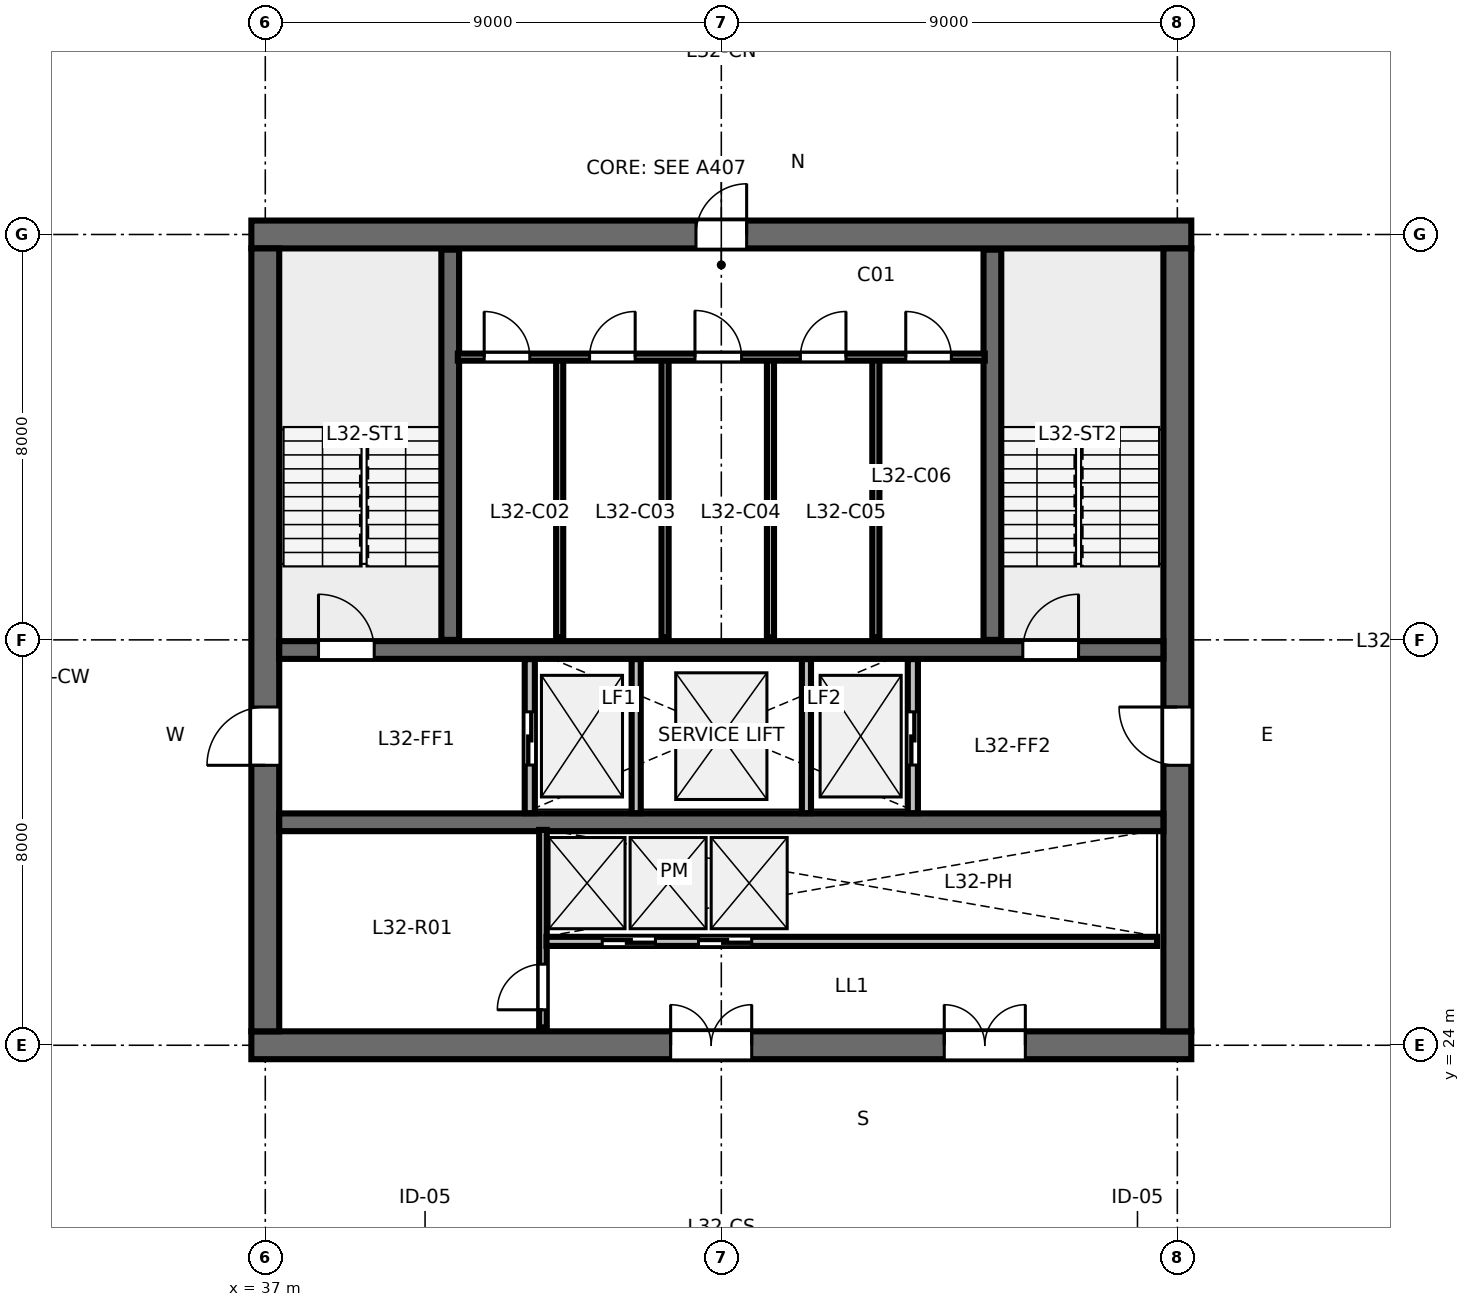
"""IFC4 building model, lengths in metres.
Left out: names, types, materials, properties, quantities, classifications, styles, units other than length and angle.
Written with IfcOpenShell. Run it as: python <this file> out.ifc"""

import sys

from ifc_helpers import new_model, si_unit, direction, frame, frame_2d, origin, place, context, subcontext, project, spatial, rectangle, extrude, element, fill, save


model = new_model("IFC4")
c1 = context("Model", 3, precision=1e-05, world=origin(), true_north=direction((0.0, 1.0)))
c2 = subcontext(c1, "Body", "Model", "MODEL_VIEW")
j1 = project(units=[si_unit("LENGTHUNIT", "METRE"), si_unit("PLANEANGLEUNIT", "RADIAN")], contexts=[c1])
p1 = place(None, origin())
s1 = spatial("IfcSite", under=j1, at=p1, CompositionType="ELEMENT")
p2 = place(p1, origin())
s2 = spatial("IfcBuilding", under=s1, at=p2, CompositionType="ELEMENT")
p3 = place(p2, frame((0.0, 0.0, 124.0)))
s3 = spatial("IfcBuildingStorey", under=s2, at=p3, CompositionType="ELEMENT", Elevation=124.0)
p4 = place(p3, frame((36.725, 24.0, 0.0), z_axis=(0.0, 0.0, 1.0), x_axis=(1.0, 0.0, 0.0)))
e1 = element("IfcWall", 1, at=p4, inside=s3, PredefinedType="SHEAR", context=c2, shape_type="SweptSolid", body=[
    extrude(rectangle(XDim=18.55, YDim=0.55, at=frame_2d((9.275, 0.0))), origin(), (0.0, 0.0, 1.0), 3.36),
])
p5 = place(p4, frame((8.275, 0.0, 0.0)))
e2 = element("IfcOpeningElement", 2, at=p5, cuts=e1, PredefinedType="OPENING", context=c2, shape_type="SweptSolid", body=[
    extrude(rectangle(XDim=1.6, YDim=2.15, at=frame_2d((0.8, 1.075))), frame((0.0, 0.285, 0.0), z_axis=(0.0, -1.0, 0.0), x_axis=(1.0, 0.0, 0.0)), (0.0, 0.0, 1.0), 0.57),
])
p6 = place(p4, frame((13.675, 0.0, 0.0)))
e3 = element("IfcOpeningElement", 3, at=p6, cuts=e1, PredefinedType="OPENING", context=c2, shape_type="SweptSolid", body=[
    extrude(rectangle(XDim=1.6, YDim=2.15, at=frame_2d((0.8, 1.075))), frame((0.0, 0.285, 0.0), z_axis=(0.0, -1.0, 0.0), x_axis=(1.0, 0.0, 0.0)), (0.0, 0.0, 1.0), 0.57),
])
p7 = place(p3, frame((36.725, 40.0, 0.0), z_axis=(0.0, 0.0, 1.0), x_axis=(1.0, 0.0, 0.0)))
e4 = element("IfcWall", 4, at=p7, inside=s3, PredefinedType="SHEAR", context=c2, shape_type="SweptSolid", body=[
    extrude(rectangle(XDim=18.55, YDim=0.55, at=frame_2d((9.275, 0.0))), origin(), (0.0, 0.0, 1.0), 3.36),
])
p8 = place(p7, frame((8.775, 0.0, 0.0)))
e5 = element("IfcOpeningElement", 5, at=p8, cuts=e4, PredefinedType="OPENING", context=c2, shape_type="SweptSolid", body=[
    extrude(rectangle(XDim=1.0, YDim=2.15, at=frame_2d((0.5, 1.075))), frame((0.0, 0.285, 0.0), z_axis=(0.0, -1.0, 0.0), x_axis=(1.0, 0.0, 0.0)), (0.0, 0.0, 1.0), 0.57),
])
p9 = place(p3, frame((37.0, 24.275, 0.0), z_axis=(0.0, 0.0, 1.0), x_axis=(0.0, 1.0, 0.0)))
e6 = element("IfcWall", 6, at=p9, inside=s3, PredefinedType="SHEAR", context=c2, shape_type="SweptSolid", body=[
    extrude(rectangle(XDim=15.45, YDim=0.55, at=frame_2d((7.725, 0.0))), origin(), (0.0, 0.0, 1.0), 3.36),
])
p10 = place(p9, frame((5.25, 0.0, 0.0)))
e7 = element("IfcOpeningElement", 7, at=p10, cuts=e6, PredefinedType="OPENING", context=c2, shape_type="SweptSolid", body=[
    extrude(rectangle(XDim=1.15, YDim=2.15, at=frame_2d((0.575, 1.075))), frame((0.0, 0.285, 0.0), z_axis=(0.0, -1.0, 0.0), x_axis=(1.0, 0.0, 0.0)), (0.0, 0.0, 1.0), 0.57),
])
p11 = place(p3, frame((55.0, 24.275, 0.0), z_axis=(0.0, 0.0, 1.0), x_axis=(0.0, 1.0, 0.0)))
e8 = element("IfcWall", 8, at=p11, inside=s3, PredefinedType="SHEAR", context=c2, shape_type="SweptSolid", body=[
    extrude(rectangle(XDim=15.45, YDim=0.55, at=frame_2d((7.725, 0.0))), origin(), (0.0, 0.0, 1.0), 3.36),
])
p12 = place(p11, frame((5.25, 0.0, 0.0)))
e9 = element("IfcOpeningElement", 9, at=p12, cuts=e8, PredefinedType="OPENING", context=c2, shape_type="SweptSolid", body=[
    extrude(rectangle(XDim=1.15, YDim=2.15, at=frame_2d((0.575, 1.075))), frame((0.0, 0.285, 0.0), z_axis=(0.0, -1.0, 0.0), x_axis=(1.0, 0.0, 0.0)), (0.0, 0.0, 1.0), 0.57),
])
p13 = place(p3, frame((37.275, 31.8, 0.0), z_axis=(0.0, 0.0, 1.0), x_axis=(1.0, 0.0, 0.0)))
e10 = element("IfcWall", 10, at=p13, inside=s3, PredefinedType="SHEAR", context=c2, shape_type="SweptSolid", body=[
    extrude(rectangle(XDim=17.45, YDim=0.35, at=frame_2d((8.725, 0.0))), origin(), (0.0, 0.0, 1.0), 3.36),
])
p14 = place(p13, frame((0.775, 0.0, 0.0)))
e11 = element("IfcOpeningElement", 11, at=p14, cuts=e10, PredefinedType="OPENING", context=c2, shape_type="SweptSolid", body=[
    extrude(rectangle(XDim=1.1, YDim=2.15, at=frame_2d((0.55, 1.075))), frame((0.0, 0.185, 0.0), z_axis=(0.0, -1.0, 0.0), x_axis=(1.0, 0.0, 0.0)), (0.0, 0.0, 1.0), 0.37),
])
p15 = place(p13, frame((14.675, 0.0, 0.0)))
e12 = element("IfcOpeningElement", 12, at=p15, cuts=e10, PredefinedType="OPENING", context=c2, shape_type="SweptSolid", body=[
    extrude(rectangle(XDim=1.1, YDim=2.15, at=frame_2d((0.55, 1.075))), frame((0.0, 0.185, 0.0), z_axis=(0.0, -1.0, 0.0), x_axis=(1.0, 0.0, 0.0)), (0.0, 0.0, 1.0), 0.37),
])
p16 = place(p3, frame((37.275, 28.4, 0.0), z_axis=(0.0, 0.0, 1.0), x_axis=(1.0, 0.0, 0.0)))
e13 = element("IfcWall", 13, at=p16, inside=s3, PredefinedType="SHEAR", context=c2, shape_type="SweptSolid", body=[
    extrude(rectangle(XDim=17.45, YDim=0.35, at=frame_2d((8.725, 0.0))), origin(), (0.0, 0.0, 1.0), 3.36),
])
for number, where, z_axis, x_axis in (
    (14, (40.65, 32.0, 0.0), (0.0, 0.0, 1.0), (0.0, 1.0, 0.0)),
    (15, (51.35, 32.0, 0.0), (0.0, 0.0, 1.0), (0.0, 1.0, 0.0)),
):
    element("IfcWall", number, at=place(p3, frame(where, z_axis=z_axis, x_axis=x_axis)), inside=s3, PredefinedType="SHEAR", context=c2, shape_type="SweptSolid", body=[
        extrude(rectangle(XDim=7.7, YDim=0.35, at=frame_2d((3.85, 0.0))), origin(), (0.0, 0.0, 1.0), 3.6),
    ])
for number, where, z_axis, x_axis in (
    (16, (42.81, 32.05, 0.0), (0.0, 0.0, 1.0), (0.0, 1.0, 0.0)),
    (17, (44.89, 32.05, 0.0), (0.0, 0.0, 1.0), (0.0, 1.0, 0.0)),
    (18, (46.97, 32.05, 0.0), (0.0, 0.0, 1.0), (0.0, 1.0, 0.0)),
    (19, (49.05, 32.05, 0.0), (0.0, 0.0, 1.0), (0.0, 1.0, 0.0)),
):
    element("IfcWall", number, at=place(p3, frame(where, z_axis=z_axis, x_axis=x_axis)), inside=s3, PredefinedType="PARTITIONING", context=c2, shape_type="SweptSolid", body=[
        extrude(rectangle(XDim=5.5, YDim=0.14, at=frame_2d((2.75, 0.0))), origin(), (0.0, 0.0, 1.0), 3.36),
    ])
p17 = place(p3, frame((40.8, 37.58, 0.0), z_axis=(0.0, 0.0, 1.0), x_axis=(1.0, 0.0, 0.0)))
e20 = element("IfcWall", 20, at=p17, inside=s3, PredefinedType="PARTITIONING", context=c2, shape_type="SweptSolid", body=[
    extrude(rectangle(XDim=10.4, YDim=0.14, at=frame_2d((5.2, 0.0))), origin(), (0.0, 0.0, 1.0), 3.36),
])
p18 = place(p17, frame((0.52, 0.0, 0.0)))
e21 = element("IfcOpeningElement", 21, at=p18, cuts=e20, PredefinedType="OPENING", context=c2, shape_type="SweptSolid", body=[
    extrude(rectangle(XDim=0.9, YDim=2.15, at=frame_2d((0.45, 1.075))), frame((0.0, 0.08, 0.0), z_axis=(0.0, -1.0, 0.0), x_axis=(1.0, 0.0, 0.0)), (0.0, 0.0, 1.0), 0.16),
])
p19 = place(p17, frame((2.6, 0.0, 0.0)))
e22 = element("IfcOpeningElement", 22, at=p19, cuts=e20, PredefinedType="OPENING", context=c2, shape_type="SweptSolid", body=[
    extrude(rectangle(XDim=0.9, YDim=2.15, at=frame_2d((0.45, 1.075))), frame((0.0, 0.08, 0.0), z_axis=(0.0, -1.0, 0.0), x_axis=(1.0, 0.0, 0.0)), (0.0, 0.0, 1.0), 0.16),
])
p20 = place(p17, frame((4.68, 0.0, 0.0)))
e23 = element("IfcOpeningElement", 23, at=p20, cuts=e20, PredefinedType="OPENING", context=c2, shape_type="SweptSolid", body=[
    extrude(rectangle(XDim=0.92, YDim=2.15, at=frame_2d((0.46, 1.075))), frame((0.0, 0.08, 0.0), z_axis=(0.0, -1.0, 0.0), x_axis=(1.0, 0.0, 0.0)), (0.0, 0.0, 1.0), 0.16),
])
p21 = place(p17, frame((6.76, 0.0, 0.0)))
e24 = element("IfcOpeningElement", 24, at=p21, cuts=e20, PredefinedType="OPENING", context=c2, shape_type="SweptSolid", body=[
    extrude(rectangle(XDim=0.9, YDim=2.15, at=frame_2d((0.45, 1.075))), frame((0.0, 0.08, 0.0), z_axis=(0.0, -1.0, 0.0), x_axis=(1.0, 0.0, 0.0)), (0.0, 0.0, 1.0), 0.16),
])
p22 = place(p17, frame((8.84, 0.0, 0.0)))
e25 = element("IfcOpeningElement", 25, at=p22, cuts=e20, PredefinedType="OPENING", context=c2, shape_type="SweptSolid", body=[
    extrude(rectangle(XDim=0.9, YDim=2.15, at=frame_2d((0.45, 1.075))), frame((0.0, 0.08, 0.0), z_axis=(0.0, -1.0, 0.0), x_axis=(1.0, 0.0, 0.0)), (0.0, 0.0, 1.0), 0.16),
])
p23 = place(p3, frame((42.22, 28.58, 0.0), z_axis=(0.0, 0.0, 1.0), x_axis=(0.0, 1.0, 0.0)))
e26 = element("IfcWall", 26, at=p23, inside=s3, PredefinedType="PARTITIONING", context=c2, shape_type="SweptSolid", body=[
    extrude(rectangle(XDim=3.04, YDim=0.2, at=frame_2d((1.52, 0.0))), origin(), (0.0, 0.0, 1.0), 3.36),
])
p24 = place(p23, frame((0.95, 0.0, 0.0)))
e27 = element("IfcOpeningElement", 27, at=p24, cuts=e26, PredefinedType="OPENING", context=c2, shape_type="SweptSolid", body=[
    extrude(rectangle(XDim=1.05, YDim=2.15, at=frame_2d((0.525, 1.075))), frame((0.0, 0.11, 0.0), z_axis=(0.0, -1.0, 0.0), x_axis=(1.0, 0.0, 0.0)), (0.0, 0.0, 1.0), 0.22),
])
p25 = place(p3, frame((49.78, 28.58, 0.0), z_axis=(0.0, 0.0, 1.0), x_axis=(0.0, 1.0, 0.0)))
e28 = element("IfcWall", 28, at=p25, inside=s3, PredefinedType="PARTITIONING", context=c2, shape_type="SweptSolid", body=[
    extrude(rectangle(XDim=3.04, YDim=0.2, at=frame_2d((1.52, 0.0))), origin(), (0.0, 0.0, 1.0), 3.36),
])
p26 = place(p25, frame((0.95, 0.0, 0.0)))
e29 = element("IfcOpeningElement", 29, at=p26, cuts=e28, PredefinedType="OPENING", context=c2, shape_type="SweptSolid", body=[
    extrude(rectangle(XDim=1.05, YDim=2.15, at=frame_2d((0.525, 1.075))), frame((0.0, 0.11, 0.0), z_axis=(0.0, -1.0, 0.0), x_axis=(1.0, 0.0, 0.0)), (0.0, 0.0, 1.0), 0.22),
])
for number, where, z_axis, x_axis in (
    (30, (44.32, 28.58, 0.0), (0.0, 0.0, 1.0), (0.0, 1.0, 0.0)),
    (31, (47.68, 28.58, 0.0), (0.0, 0.0, 1.0), (0.0, 1.0, 0.0)),
):
    element("IfcWall", number, at=place(p3, frame(where, z_axis=z_axis, x_axis=x_axis)), inside=s3, PredefinedType="PARTITIONING", context=c2, shape_type="SweptSolid", body=[
        extrude(rectangle(XDim=3.04, YDim=0.18, at=frame_2d((1.52, 0.0))), origin(), (0.0, 0.0, 1.0), 3.36),
    ])
p27 = place(p3, frame((42.48, 24.35, 0.0), z_axis=(0.0, 0.0, 1.0), x_axis=(0.0, 1.0, 0.0)))
e32 = element("IfcWall", 32, at=p27, inside=s3, PredefinedType="PARTITIONING", context=c2, shape_type="SweptSolid", body=[
    extrude(rectangle(XDim=3.9, YDim=0.15, at=frame_2d((1.95, 0.0))), origin(), (0.0, 0.0, 1.0), 3.36),
])
p28 = place(p27, frame((0.35, 0.0, 0.0)))
e33 = element("IfcOpeningElement", 33, at=p28, cuts=e32, PredefinedType="OPENING", context=c2, shape_type="SweptSolid", body=[
    extrude(rectangle(XDim=0.9, YDim=2.15, at=frame_2d((0.45, 1.075))), frame((0.0, 0.085, 0.0), z_axis=(0.0, -1.0, 0.0), x_axis=(1.0, 0.0, 0.0)), (0.0, 0.0, 1.0), 0.17),
])
p29 = place(p3, frame((42.55, 26.05, 0.0), z_axis=(0.0, 0.0, 1.0), x_axis=(1.0, 0.0, 0.0)))
e34 = element("IfcWall", 34, at=p29, inside=s3, PredefinedType="PARTITIONING", context=c2, shape_type="SweptSolid", body=[
    extrude(rectangle(XDim=12.05, YDim=0.18, at=frame_2d((6.025, 0.0))), origin(), (0.0, 0.0, 1.0), 3.36),
])
p30 = place(p29, frame((1.1, 0.0, 0.0)))
e35 = element("IfcOpeningElement", 35, at=p30, cuts=e34, PredefinedType="OPENING", context=c2, shape_type="SweptSolid", body=[
    extrude(rectangle(XDim=1.05, YDim=2.15, at=frame_2d((0.525, 1.075))), frame((0.0, 0.1, 0.0), z_axis=(0.0, -1.0, 0.0), x_axis=(1.0, 0.0, 0.0)), (0.0, 0.0, 1.0), 0.2),
])
p31 = place(p29, frame((3.0, 0.0, 0.0)))
e36 = element("IfcOpeningElement", 36, at=p31, cuts=e34, PredefinedType="OPENING", context=c2, shape_type="SweptSolid", body=[
    extrude(rectangle(XDim=1.05, YDim=2.15, at=frame_2d((0.525, 1.075))), frame((0.0, 0.1, 0.0), z_axis=(0.0, -1.0, 0.0), x_axis=(1.0, 0.0, 0.0)), (0.0, 0.0, 1.0), 0.2),
])
p32 = place(p14, origin())
e37 = element("IfcDoor", 37, at=p32, inside=s3, OperationType="SINGLE_SWING_LEFT", PredefinedType="DOOR", context=c2, shape_type="SweptSolid", body=[
    extrude(rectangle(XDim=1.1, YDim=2.15, at=frame_2d((0.55, 1.075))), frame((0.0, 0.025, 0.0), z_axis=(0.0, -1.0, 0.0), x_axis=(1.0, 0.0, 0.0)), (0.0, 0.0, 1.0), 0.05),
])
fill(e11, e37)
p33 = place(p15, origin())
e38 = element("IfcDoor", 38, at=p33, inside=s3, OperationType="SINGLE_SWING_RIGHT", PredefinedType="DOOR", context=c2, shape_type="SweptSolid", body=[
    extrude(rectangle(XDim=1.1, YDim=2.15, at=frame_2d((0.55, 1.075))), frame((0.0, 0.025, 0.0), z_axis=(0.0, -1.0, 0.0), x_axis=(1.0, 0.0, 0.0)), (0.0, 0.0, 1.0), 0.05),
])
fill(e12, e38)
p34 = place(p8, origin())
e39 = element("IfcDoor", 39, at=p34, inside=s3, OperationType="SINGLE_SWING_RIGHT", PredefinedType="DOOR", context=c2, shape_type="SweptSolid", body=[
    extrude(rectangle(XDim=1.0, YDim=2.15, at=frame_2d((0.5, 1.075))), frame((0.0, 0.025, 0.0), z_axis=(0.0, -1.0, 0.0), x_axis=(1.0, 0.0, 0.0)), (0.0, 0.0, 1.0), 0.05),
])
fill(e5, e39)
p35 = place(p10, origin())
e40 = element("IfcDoor", 40, at=p35, inside=s3, OperationType="SINGLE_SWING_LEFT", PredefinedType="DOOR", context=c2, shape_type="SweptSolid", body=[
    extrude(rectangle(XDim=1.15, YDim=2.15, at=frame_2d((0.575, 1.075))), frame((0.0, 0.025, 0.0), z_axis=(0.0, -1.0, 0.0), x_axis=(1.0, 0.0, 0.0)), (0.0, 0.0, 1.0), 0.05),
])
fill(e7, e40)
p36 = place(p12, origin())
e41 = element("IfcDoor", 41, at=p36, inside=s3, OperationType="SINGLE_SWING_RIGHT", PredefinedType="DOOR", context=c2, shape_type="SweptSolid", body=[
    extrude(rectangle(XDim=1.15, YDim=2.15, at=frame_2d((0.575, 1.075))), frame((0.0, 0.025, 0.0), z_axis=(0.0, -1.0, 0.0), x_axis=(1.0, 0.0, 0.0)), (0.0, 0.0, 1.0), 0.05),
])
fill(e9, e41)
p37 = place(p5, origin())
e42 = element("IfcDoor", 42, at=p37, inside=s3, OperationType="DOUBLE_DOOR_SINGLE_SWING", PredefinedType="DOOR", context=c2, shape_type="SweptSolid", body=[
    extrude(rectangle(XDim=1.6, YDim=2.15, at=frame_2d((0.8, 1.075))), frame((0.0, 0.025, 0.0), z_axis=(0.0, -1.0, 0.0), x_axis=(1.0, 0.0, 0.0)), (0.0, 0.0, 1.0), 0.05),
])
fill(e2, e42)
p38 = place(p6, origin())
e43 = element("IfcDoor", 43, at=p38, inside=s3, OperationType="DOUBLE_DOOR_SINGLE_SWING", PredefinedType="DOOR", context=c2, shape_type="SweptSolid", body=[
    extrude(rectangle(XDim=1.6, YDim=2.15, at=frame_2d((0.8, 1.075))), frame((0.0, 0.025, 0.0), z_axis=(0.0, -1.0, 0.0), x_axis=(1.0, 0.0, 0.0)), (0.0, 0.0, 1.0), 0.05),
])
fill(e3, e43)
p39 = place(p18, origin())
e44 = element("IfcDoor", 44, at=p39, inside=s3, OperationType="SINGLE_SWING_LEFT", PredefinedType="DOOR", context=c2, shape_type="SweptSolid", body=[
    extrude(rectangle(XDim=0.9, YDim=2.15, at=frame_2d((0.45, 1.075))), frame((0.0, 0.025, 0.0), z_axis=(0.0, -1.0, 0.0), x_axis=(1.0, 0.0, 0.0)), (0.0, 0.0, 1.0), 0.05),
])
fill(e21, e44)
p40 = place(p19, origin())
e45 = element("IfcDoor", 45, at=p40, inside=s3, OperationType="SINGLE_SWING_RIGHT", PredefinedType="DOOR", context=c2, shape_type="SweptSolid", body=[
    extrude(rectangle(XDim=0.9, YDim=2.15, at=frame_2d((0.45, 1.075))), frame((0.0, 0.025, 0.0), z_axis=(0.0, -1.0, 0.0), x_axis=(1.0, 0.0, 0.0)), (0.0, 0.0, 1.0), 0.05),
])
fill(e22, e45)
p41 = place(p20, origin())
e46 = element("IfcDoor", 46, at=p41, inside=s3, OperationType="SINGLE_SWING_LEFT", PredefinedType="DOOR", context=c2, shape_type="SweptSolid", body=[
    extrude(rectangle(XDim=0.92, YDim=2.15, at=frame_2d((0.46, 1.075))), frame((0.0, 0.025, 0.0), z_axis=(0.0, -1.0, 0.0), x_axis=(1.0, 0.0, 0.0)), (0.0, 0.0, 1.0), 0.05),
])
fill(e23, e46)
p42 = place(p21, origin())
e47 = element("IfcDoor", 47, at=p42, inside=s3, OperationType="SINGLE_SWING_RIGHT", PredefinedType="DOOR", context=c2, shape_type="SweptSolid", body=[
    extrude(rectangle(XDim=0.9, YDim=2.15, at=frame_2d((0.45, 1.075))), frame((0.0, 0.025, 0.0), z_axis=(0.0, -1.0, 0.0), x_axis=(1.0, 0.0, 0.0)), (0.0, 0.0, 1.0), 0.05),
])
fill(e24, e47)
p43 = place(p22, origin())
e48 = element("IfcDoor", 48, at=p43, inside=s3, OperationType="SINGLE_SWING_LEFT", PredefinedType="DOOR", context=c2, shape_type="SweptSolid", body=[
    extrude(rectangle(XDim=0.9, YDim=2.15, at=frame_2d((0.45, 1.075))), frame((0.0, 0.025, 0.0), z_axis=(0.0, -1.0, 0.0), x_axis=(1.0, 0.0, 0.0)), (0.0, 0.0, 1.0), 0.05),
])
fill(e25, e48)
p44 = place(p24, origin())
e49 = element("IfcDoor", 49, at=p44, inside=s3, OperationType="SLIDING_TO_LEFT", PredefinedType="DOOR", context=c2, shape_type="SweptSolid", body=[
    extrude(rectangle(XDim=1.05, YDim=2.15, at=frame_2d((0.525, 1.075))), frame((0.0, 0.025, 0.0), z_axis=(0.0, -1.0, 0.0), x_axis=(1.0, 0.0, 0.0)), (0.0, 0.0, 1.0), 0.05),
])
fill(e27, e49)
p45 = place(p26, origin())
e50 = element("IfcDoor", 50, at=p45, inside=s3, OperationType="SLIDING_TO_RIGHT", PredefinedType="DOOR", context=c2, shape_type="SweptSolid", body=[
    extrude(rectangle(XDim=1.05, YDim=2.15, at=frame_2d((0.525, 1.075))), frame((0.0, 0.025, 0.0), z_axis=(0.0, -1.0, 0.0), x_axis=(1.0, 0.0, 0.0)), (0.0, 0.0, 1.0), 0.05),
])
fill(e29, e50)
p46 = place(p28, origin())
e51 = element("IfcDoor", 51, at=p46, inside=s3, OperationType="SINGLE_SWING_LEFT", PredefinedType="DOOR", context=c2, shape_type="SweptSolid", body=[
    extrude(rectangle(XDim=0.9, YDim=2.15, at=frame_2d((0.45, 1.075))), frame((0.0, 0.025, 0.0), z_axis=(0.0, -1.0, 0.0), x_axis=(1.0, 0.0, 0.0)), (0.0, 0.0, 1.0), 0.05),
])
fill(e33, e51)
p47 = place(p30, origin())
e52 = element("IfcDoor", 52, at=p47, inside=s3, OperationType="SLIDING_TO_LEFT", PredefinedType="DOOR", context=c2, shape_type="SweptSolid", body=[
    extrude(rectangle(XDim=1.05, YDim=2.15, at=frame_2d((0.525, 1.075))), frame((0.0, 0.025, 0.0), z_axis=(0.0, -1.0, 0.0), x_axis=(1.0, 0.0, 0.0)), (0.0, 0.0, 1.0), 0.05),
])
fill(e35, e52)
p48 = place(p31, origin())
e53 = element("IfcDoor", 53, at=p48, inside=s3, OperationType="SLIDING_TO_RIGHT", PredefinedType="DOOR", context=c2, shape_type="SweptSolid", body=[
    extrude(rectangle(XDim=1.05, YDim=2.15, at=frame_2d((0.525, 1.075))), frame((0.0, 0.025, 0.0), z_axis=(0.0, -1.0, 0.0), x_axis=(1.0, 0.0, 0.0)), (0.0, 0.0, 1.0), 0.05),
])
fill(e36, e53)
save(model, sys.argv[1])
